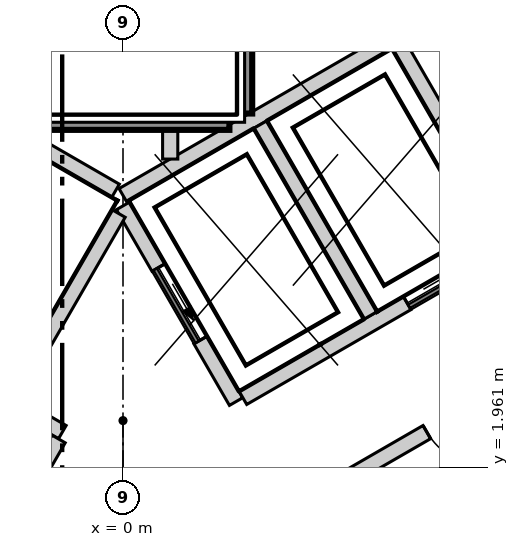
"""IFC4 building model, lengths in metres.
Left out: names, types, materials, properties, quantities, classifications, styles, units other than length and angle.
Written with IfcOpenShell. Run it as: python <this file> out.ifc"""

import sys

from ifc_helpers import new_model, si_unit, direction, frame, frame_2d, origin, place, context, subcontext, project, spatial, polyline, rectangle, outline, extrude, element, fill, save


model = new_model("IFC4")
c1 = context("Model", 3, precision=1e-05, world=origin(), true_north=direction((0.0, 1.0)))
c2 = subcontext(c1, "Body", "Model", "MODEL_VIEW")
j1 = project(units=[si_unit("LENGTHUNIT", "METRE"), si_unit("PLANEANGLEUNIT", "RADIAN")], contexts=[c1])
p1 = place(None, origin())
s1 = spatial("IfcSite", under=j1, at=p1, CompositionType="ELEMENT")
p2 = place(p1, origin())
s2 = spatial("IfcBuilding", under=s1, at=p2, CompositionType="ELEMENT")
p3 = place(p2, frame((0.0, 0.0, 300.7)))
s3 = spatial("IfcBuildingStorey", under=s2, at=p3, CompositionType="ELEMENT", Elevation=300.7)
p4 = place(p3, frame((12.384, -5.15, -0.3), z_axis=(0.0, 0.0, 1.0), x_axis=(-0.500000539815, 0.866025092122, 0.0)))
e1 = element("IfcWall", 1, at=p4, inside=s3, PredefinedType="SHEAR", context=c2, shape_type="SweptSolid", body=[
    extrude(outline(polyline([(-0.173, -0.301), (1.795, -0.301), (3.763, -0.301), (5.731, -0.301), (7.7, -0.301), (9.668, -0.301), (11.636, -0.301), (13.604, -0.3), (15.573, -0.3), (17.541, -0.3), (19.509, -0.3), (21.477, -0.3), (21.131, 0.3), (19.226, 0.3), (17.321, 0.3), (15.415, 0.3), (13.51, 0.3), (11.605, 0.3), (9.699, 0.3), (7.794, 0.3), (5.889, 0.3), (3.984, 0.3), (2.078, 0.3), (0.173, 0.3), (-0.173, -0.301)])), origin(), (0.0, 0.0, 1.0), 3.6),
])
p5 = place(p4, frame((16.328, 0.0, 0.3)))
e2 = element("IfcOpeningElement", 2, at=p5, cuts=e1, PredefinedType="OPENING", context=c2, shape_type="SweptSolid", body=[
    extrude(rectangle(XDim=1.0, YDim=2.1, at=frame_2d((0.5, 1.05))), frame((0.0, 0.31, 0.0), z_axis=(0.0, -1.0, 0.0), x_axis=(1.0, 0.0, 0.0)), (0.0, 0.0, 1.0), 0.621),
])
p6 = place(p4, frame((4.777, 0.0, 0.3)))
e3 = element("IfcOpeningElement", 3, at=p6, cuts=e1, PredefinedType="OPENING", context=c2, shape_type="SweptSolid", body=[
    extrude(rectangle(XDim=0.9, YDim=2.1, at=frame_2d((0.45, 1.05))), frame((0.0, 0.31, 0.0), z_axis=(0.0, -1.0, 0.0), x_axis=(1.0, 0.0, 0.0)), (0.0, 0.0, 1.0), 0.621),
])
p7 = place(p3, frame((24.96, -11.578, 0.0), z_axis=(0.0, 0.0, 1.0), x_axis=(-0.500002391419, 0.866024023094, 0.0)))
e4 = element("IfcWall", 4, at=p7, inside=s3, PredefinedType="ELEMENTEDWALL", context=c2, shape_type="SweptSolid", body=[
    extrude(rectangle(XDim=44.994, YDim=0.2, at=frame_2d((22.497, 0.0))), origin(), (0.0, 0.0, 1.0), 3.3),
])
p8 = place(p7, frame((2.103, 0.0, 0.9)))
e5 = element("IfcOpeningElement", 5, at=p8, cuts=e4, PredefinedType="OPENING", context=c2, shape_type="SweptSolid", body=[
    extrude(rectangle(XDim=3.7, YDim=2.2, at=frame_2d((1.85, 1.1))), frame((0.0, 0.11, 0.0), z_axis=(0.0, -1.0, 0.0), x_axis=(1.0, 0.0, 0.0)), (0.0, 0.0, 1.0), 0.22),
])
p9 = place(p7, frame((7.404, 0.0, 0.9)))
e6 = element("IfcOpeningElement", 6, at=p9, cuts=e4, PredefinedType="OPENING", context=c2, shape_type="SweptSolid", body=[
    extrude(rectangle(XDim=3.7, YDim=2.2, at=frame_2d((1.85, 1.1))), frame((0.0, 0.11, 0.0), z_axis=(0.0, -1.0, 0.0), x_axis=(1.0, 0.0, 0.0)), (0.0, 0.0, 1.0), 0.22),
])
p10 = place(p7, frame((12.705, 0.0, 0.9)))
e7 = element("IfcOpeningElement", 7, at=p10, cuts=e4, PredefinedType="OPENING", context=c2, shape_type="SweptSolid", body=[
    extrude(rectangle(XDim=3.7, YDim=2.2, at=frame_2d((1.85, 1.1))), frame((0.0, 0.11, 0.0), z_axis=(0.0, -1.0, 0.0), x_axis=(1.0, 0.0, 0.0)), (0.0, 0.0, 1.0), 0.22),
])
p11 = place(p7, frame((18.006, 0.0, 0.9)))
e8 = element("IfcOpeningElement", 8, at=p11, cuts=e4, PredefinedType="OPENING", context=c2, shape_type="SweptSolid", body=[
    extrude(rectangle(XDim=3.7, YDim=2.2, at=frame_2d((1.85, 1.1))), frame((0.0, 0.11, 0.0), z_axis=(0.0, -1.0, 0.0), x_axis=(1.0, 0.0, 0.0)), (0.0, 0.0, 1.0), 0.22),
])
p12 = place(p7, frame((23.308, 0.0, 0.9)))
e9 = element("IfcOpeningElement", 9, at=p12, cuts=e4, PredefinedType="OPENING", context=c2, shape_type="SweptSolid", body=[
    extrude(rectangle(XDim=3.7, YDim=2.2, at=frame_2d((1.85, 1.1))), frame((0.0, 0.11, 0.0), z_axis=(0.0, -1.0, 0.0), x_axis=(1.0, 0.0, 0.0)), (0.0, 0.0, 1.0), 0.22),
])
p13 = place(p7, frame((28.609, 0.0, 0.9)))
e10 = element("IfcOpeningElement", 10, at=p13, cuts=e4, PredefinedType="OPENING", context=c2, shape_type="SweptSolid", body=[
    extrude(rectangle(XDim=3.7, YDim=2.2, at=frame_2d((1.85, 1.1))), frame((0.0, 0.11, 0.0), z_axis=(0.0, -1.0, 0.0), x_axis=(1.0, 0.0, 0.0)), (0.0, 0.0, 1.0), 0.22),
])
p14 = place(p7, frame((33.91, 0.0, 0.9)))
e11 = element("IfcOpeningElement", 11, at=p14, cuts=e4, PredefinedType="OPENING", context=c2, shape_type="SweptSolid", body=[
    extrude(rectangle(XDim=3.7, YDim=2.2, at=frame_2d((1.85, 1.1))), frame((0.0, 0.11, 0.0), z_axis=(0.0, -1.0, 0.0), x_axis=(1.0, 0.0, 0.0)), (0.0, 0.0, 1.0), 0.22),
])
p15 = place(p7, frame((39.211, 0.0, 0.9)))
e12 = element("IfcOpeningElement", 12, at=p15, cuts=e4, PredefinedType="OPENING", context=c2, shape_type="SweptSolid", body=[
    extrude(rectangle(XDim=3.7, YDim=2.2, at=frame_2d((1.85, 1.1))), frame((0.0, 0.11, 0.0), z_axis=(0.0, -1.0, 0.0), x_axis=(1.0, 0.0, 0.0)), (0.0, 0.0, 1.0), 0.22),
])
p16 = place(p3, frame((-17.679, -10.12, 0.0), z_axis=(0.0, 0.0, 1.0), x_axis=(0.500008955215, 0.866020233427, 0.0)))
e13 = element("IfcWall", 13, at=p16, inside=s3, PredefinedType="PARTITIONING", context=c2, shape_type="SweptSolid", body=[
    extrude(rectangle(XDim=35.357, YDim=0.15, at=frame_2d((17.679, 0.0))), origin(), (0.0, 0.0, 1.0), 3.3),
])
p17 = place(p16, frame((31.307, 0.0, 0.0)))
e14 = element("IfcOpeningElement", 14, at=p17, cuts=e13, PredefinedType="OPENING", context=c2, shape_type="SweptSolid", body=[
    extrude(rectangle(XDim=1.0, YDim=2.1, at=frame_2d((0.5, 1.05))), frame((0.0, 0.085, 0.0), z_axis=(0.0, -1.0, 0.0), x_axis=(1.0, 0.0, 0.0)), (0.0, 0.0, 1.0), 0.17),
])
p18 = place(p16, frame((20.056, 0.0, 0.0)))
e15 = element("IfcOpeningElement", 15, at=p18, cuts=e13, PredefinedType="OPENING", context=c2, shape_type="SweptSolid", body=[
    extrude(rectangle(XDim=1.0, YDim=2.1, at=frame_2d((0.5, 1.05))), frame((0.0, 0.085, 0.0), z_axis=(0.0, -1.0, 0.0), x_axis=(1.0, 0.0, 0.0)), (0.0, 0.0, 1.0), 0.17),
])
p19 = place(p16, frame((13.253, 0.0, 0.0)))
e16 = element("IfcOpeningElement", 16, at=p19, cuts=e13, PredefinedType="OPENING", context=c2, shape_type="SweptSolid", body=[
    extrude(rectangle(XDim=1.0, YDim=2.1, at=frame_2d((0.5, 1.05))), frame((0.0, 0.085, 0.0), z_axis=(0.0, -1.0, 0.0), x_axis=(1.0, 0.0, 0.0)), (0.0, 0.0, 1.0), 0.17),
])
p20 = place(p16, frame((7.653, 0.0, 0.0)))
e17 = element("IfcOpeningElement", 17, at=p20, cuts=e13, PredefinedType="OPENING", context=c2, shape_type="SweptSolid", body=[
    extrude(rectangle(XDim=1.0, YDim=2.1, at=frame_2d((0.5, 1.05))), frame((0.0, 0.085, 0.0), z_axis=(0.0, -1.0, 0.0), x_axis=(1.0, 0.0, 0.0)), (0.0, 0.0, 1.0), 0.17),
])
p21 = place(p16, frame((2.952, 0.0, 0.0)))
e18 = element("IfcOpeningElement", 18, at=p21, cuts=e13, PredefinedType="OPENING", context=c2, shape_type="SweptSolid", body=[
    extrude(rectangle(XDim=1.0, YDim=2.1, at=frame_2d((0.5, 1.05))), frame((0.0, 0.085, 0.0), z_axis=(0.0, -1.0, 0.0), x_axis=(1.0, 0.0, 0.0)), (0.0, 0.0, 1.0), 0.17),
])
p22 = place(p3, frame((0.075, 20.37, 0.0), z_axis=(0.0, 0.0, 1.0), x_axis=(0.500009775255, -0.866019759965, 0.0)))
e19 = element("IfcWall", 19, at=p22, inside=s3, PredefinedType="PARTITIONING", context=c2, shape_type="SweptSolid", body=[
    extrude(rectangle(XDim=35.207, YDim=0.15, at=frame_2d((17.604, 0.0))), origin(), (0.0, 0.0, 1.0), 3.3),
])
p23 = place(p22, frame((31.307, 0.0, 0.0)))
e20 = element("IfcOpeningElement", 20, at=p23, cuts=e19, PredefinedType="OPENING", context=c2, shape_type="SweptSolid", body=[
    extrude(rectangle(XDim=1.0, YDim=2.1, at=frame_2d((0.5, 1.05))), frame((0.0, 0.085, 0.0), z_axis=(0.0, -1.0, 0.0), x_axis=(1.0, 0.0, 0.0)), (0.0, 0.0, 1.0), 0.17),
])
p24 = place(p22, frame((20.355, 0.0, 0.0)))
e21 = element("IfcOpeningElement", 21, at=p24, cuts=e19, PredefinedType="OPENING", context=c2, shape_type="SweptSolid", body=[
    extrude(rectangle(XDim=1.0, YDim=2.1, at=frame_2d((0.5, 1.05))), frame((0.0, 0.085, 0.0), z_axis=(0.0, -1.0, 0.0), x_axis=(1.0, 0.0, 0.0)), (0.0, 0.0, 1.0), 0.17),
])
p25 = place(p22, frame((24.355, 0.0, 0.0)))
e22 = element("IfcOpeningElement", 22, at=p25, cuts=e19, PredefinedType="OPENING", context=c2, shape_type="SweptSolid", body=[
    extrude(rectangle(XDim=0.9, YDim=2.1, at=frame_2d((0.45, 1.05))), frame((0.0, 0.085, 0.0), z_axis=(0.0, -1.0, 0.0), x_axis=(1.0, 0.0, 0.0)), (0.0, 0.0, 1.0), 0.17),
])
p26 = place(p22, frame((22.255, 0.0, 0.0)))
e23 = element("IfcOpeningElement", 23, at=p26, cuts=e19, PredefinedType="OPENING", context=c2, shape_type="SweptSolid", body=[
    extrude(rectangle(XDim=0.9, YDim=2.1, at=frame_2d((0.45, 1.05))), frame((0.0, 0.085, 0.0), z_axis=(0.0, -1.0, 0.0), x_axis=(1.0, 0.0, 0.0)), (0.0, 0.0, 1.0), 0.17),
])
p27 = place(p22, frame((8.453, 0.0, 0.0)))
e24 = element("IfcOpeningElement", 24, at=p27, cuts=e19, PredefinedType="OPENING", context=c2, shape_type="SweptSolid", body=[
    extrude(rectangle(XDim=1.0, YDim=2.1, at=frame_2d((0.5, 1.05))), frame((0.0, 0.085, 0.0), z_axis=(0.0, -1.0, 0.0), x_axis=(1.0, 0.0, 0.0)), (0.0, 0.0, 1.0), 0.17),
])
p28 = place(p22, frame((13.753, 0.0, 0.0)))
e25 = element("IfcOpeningElement", 25, at=p28, cuts=e19, PredefinedType="OPENING", context=c2, shape_type="SweptSolid", body=[
    extrude(rectangle(XDim=0.9, YDim=2.1, at=frame_2d((0.45, 1.05))), frame((0.0, 0.085, 0.0), z_axis=(0.0, -1.0, 0.0), x_axis=(1.0, 0.0, 0.0)), (0.0, 0.0, 1.0), 0.17),
])
p29 = place(p22, frame((11.553, 0.0, 0.0)))
e26 = element("IfcOpeningElement", 26, at=p29, cuts=e19, PredefinedType="OPENING", context=c2, shape_type="SweptSolid", body=[
    extrude(rectangle(XDim=0.9, YDim=2.1, at=frame_2d((0.45, 1.05))), frame((0.0, 0.085, 0.0), z_axis=(0.0, -1.0, 0.0), x_axis=(1.0, 0.0, 0.0)), (0.0, 0.0, 1.0), 0.17),
])
p30 = place(p22, frame((2.951, 0.0, 0.0)))
e27 = element("IfcOpeningElement", 27, at=p30, cuts=e19, PredefinedType="OPENING", context=c2, shape_type="SweptSolid", body=[
    extrude(rectangle(XDim=1.0, YDim=2.1, at=frame_2d((0.5, 1.05))), frame((0.0, 0.085, 0.0), z_axis=(0.0, -1.0, 0.0), x_axis=(1.0, 0.0, 0.0)), (0.0, 0.0, 1.0), 0.17),
])
p31 = place(p3, frame((-0.002, 5.541, 0.0), z_axis=(0.0, 0.0, 1.0), x_axis=(0.86600155993, 0.500041296494, 0.0)))
e28 = element("IfcWall", 28, at=p31, inside=s3, PredefinedType="SOLIDWALL", context=c2, shape_type="SweptSolid", body=[
    extrude(rectangle(XDim=4.132, YDim=0.2, at=frame_2d((2.066, 0.0))), origin(), (0.0, 0.0, 1.0), 3.3),
])
p32 = place(p3, frame((0.0, 5.4, 0.0), z_axis=(0.0, 0.0, 1.0), x_axis=(0.500103862429, -0.865965430478, 0.0)))
e29 = element("IfcWall", 29, at=p32, inside=s3, PredefinedType="SOLIDWALL", context=c2, shape_type="SweptSolid", body=[
    extrude(rectangle(XDim=2.973, YDim=0.2, at=frame_2d((1.487, 0.0))), origin(), (0.0, 0.0, 1.0), 3.3),
])
p33 = place(p32, frame((0.937, 0.0, 0.0)))
e30 = element("IfcOpeningElement", 30, at=p33, cuts=e29, PredefinedType="OPENING", context=c2, shape_type="SweptSolid", body=[
    extrude(rectangle(XDim=1.1, YDim=2.1, at=frame_2d((0.55, 1.05))), frame((0.0, 0.11, 0.0), z_axis=(0.0, -1.0, 0.0), x_axis=(1.0, 0.0, 0.0)), (0.0, 0.0, 1.0), 0.22),
])
p34 = place(p3, frame((1.578, 2.874, 0.0), z_axis=(0.0, 0.0, 1.0), x_axis=(0.866045911672, 0.499964477614, 0.0)))
e31 = element("IfcWall", 31, at=p34, inside=s3, PredefinedType="SOLIDWALL", context=c2, shape_type="SweptSolid", body=[
    extrude(rectangle(XDim=5.327, YDim=0.2, at=frame_2d((2.663, 0.0))), origin(), (0.0, 0.0, 1.0), 3.3),
])
p35 = place(p34, frame((2.496, 0.0, 0.0)))
e32 = element("IfcOpeningElement", 32, at=p35, cuts=e31, PredefinedType="OPENING", context=c2, shape_type="SweptSolid", body=[
    extrude(rectangle(XDim=1.1, YDim=2.1, at=frame_2d((0.55, 1.05))), frame((0.0, 0.11, 0.0), z_axis=(0.0, -1.0, 0.0), x_axis=(1.0, 0.0, 0.0)), (0.0, 0.0, 1.0), 0.22),
])
for number, where, z_axis, x_axis in (
    (33, (3.626, 7.52, 0.0), (0.0, 0.0, 1.0), (0.5, -0.866, 0.0)),
    (34, (1.807, 6.47, 0.0), (0.0, 0.0, 1.0), (0.5, -0.866, 0.0)),
):
    element("IfcWall", number, at=place(p3, frame(where, z_axis=z_axis, x_axis=x_axis)), inside=s3, PredefinedType="SOLIDWALL", context=c2, shape_type="SweptSolid", body=[
        extrude(rectangle(XDim=2.9, YDim=0.2, at=frame_2d((1.45, 0.0))), origin(), (0.0, 0.0, 1.0), 3.3),
    ])
p36 = place(p3, frame((2.548, 1.587, 0.0), z_axis=(0.0, 0.0, 1.0), x_axis=(0.866004344652, 0.500036473714, 0.0)))
e35 = element("IfcWall", 35, at=p36, inside=s3, PredefinedType="SOLIDWALL", context=c2, shape_type="SweptSolid", body=[
    extrude(rectangle(XDim=4.15, YDim=0.2, at=frame_2d((2.075, 0.0))), origin(), (0.0, 0.0, 1.0), 3.3),
])
p37 = place(p36, frame((1.675, 0.0, 0.0)))
e36 = element("IfcOpeningElement", 36, at=p37, cuts=e35, PredefinedType="OPENING", context=c2, shape_type="SweptSolid", body=[
    extrude(rectangle(XDim=0.9, YDim=2.1, at=frame_2d((0.45, 1.05))), frame((0.0, 0.11, 0.0), z_axis=(0.0, -1.0, 0.0), x_axis=(1.0, 0.0, 0.0)), (0.0, 0.0, 1.0), 0.22),
])
p38 = place(p3, frame((-1.488, 2.822, 0.0), z_axis=(0.0, 0.0, 1.0), x_axis=(0.866236612152, -0.499633997809, 0.0)))
e37 = element("IfcWall", 37, at=p38, inside=s3, PredefinedType="SOLIDWALL", context=c2, shape_type="SweptSolid", body=[
    extrude(rectangle(XDim=0.796, YDim=0.2, at=frame_2d((0.398, 0.0))), origin(), (0.0, 0.0, 1.0), 3.3),
])
p39 = place(p3, frame((-2.444, -0.433, 0.0), z_axis=(0.0, 0.0, 1.0), x_axis=(0.500035624827, 0.866004834804, 0.0)))
e38 = element("IfcWall", 38, at=p39, inside=s3, PredefinedType="SOLIDWALL", context=c2, shape_type="SweptSolid", body=[
    extrude(rectangle(XDim=3.194, YDim=0.2, at=frame_2d((1.597, 0.0))), origin(), (0.0, 0.0, 1.0), 3.3),
])
p40 = place(p3, frame((-1.67, 6.507, 0.0), z_axis=(0.0, 0.0, 1.0), x_axis=(0.865941441609, -0.500145398563, 0.0)))
e39 = element("IfcWall", 39, at=p40, inside=s3, PredefinedType="SOLIDWALL", context=c2, shape_type="SweptSolid", body=[
    extrude(rectangle(XDim=1.815, YDim=0.2, at=frame_2d((0.908, 0.0))), origin(), (0.0, 0.0, 1.0), 3.3),
])
p41 = place(p3, frame((-1.438, 2.909, 0.0), z_axis=(0.0, 0.0, 1.0), x_axis=(0.499829630636, 0.866123744241, 0.0)))
e40 = element("IfcWall", 40, at=p41, inside=s3, PredefinedType="SOLIDWALL", context=c2, shape_type="SweptSolid", body=[
    extrude(rectangle(XDim=2.761, YDim=0.2, at=frame_2d((1.38, 0.0))), origin(), (0.0, 0.0, 1.0), 3.3),
])
p42 = place(p3, frame((0.621, 6.016, 0.0), z_axis=(0.0, 0.0, 1.0), x_axis=(0.0, 1.0, 0.0)))
e41 = element("IfcWall", 41, at=p42, inside=s3, PredefinedType="SOLIDWALL", context=c2, shape_type="SweptSolid", body=[
    extrude(rectangle(XDim=0.384, YDim=0.2, at=frame_2d((0.192, 0.0))), origin(), (0.0, 0.0, 1.0), 3.3),
])
p43 = place(p3, frame((1.6, 6.615, 0.0), z_axis=(0.0, 0.0, 1.0), x_axis=(0.0, 1.0, 0.0)))
e42 = element("IfcWall", 42, at=p43, inside=s3, PredefinedType="SOLIDWALL", context=c2, shape_type="SweptSolid", body=[
    extrude(rectangle(XDim=6.665, YDim=0.2, at=frame_2d((3.333, 0.0))), origin(), (0.0, 0.0, 1.0), 3.3),
])
p44 = place(p3, frame((-1.4, 6.5, 0.0), z_axis=(0.0, 0.0, 1.0), x_axis=(1.0, 0.0, 0.0)))
e43 = element("IfcWall", 43, at=p44, inside=s3, PredefinedType="SOLIDWALL", context=c2, shape_type="SweptSolid", body=[
    extrude(rectangle(XDim=2.8, YDim=0.2, at=frame_2d((1.4, 0.0))), origin(), (0.0, 0.0, 1.0), 3.3),
])
p45 = place(p33, origin())
e44 = element("IfcDoor", 44, at=p45, inside=s3, OperationType="SLIDING_TO_LEFT", PredefinedType="DOOR", context=c2, shape_type="SweptSolid", body=[
    extrude(rectangle(XDim=1.1, YDim=2.1, at=frame_2d((0.55, 1.05))), frame((0.0, 0.025, 0.0), z_axis=(0.0, -1.0, 0.0), x_axis=(1.0, 0.0, 0.0)), (0.0, 0.0, 1.0), 0.05),
])
fill(e30, e44)
p46 = place(p35, origin())
e45 = element("IfcDoor", 45, at=p46, inside=s3, OperationType="SLIDING_TO_LEFT", PredefinedType="DOOR", context=c2, shape_type="SweptSolid", body=[
    extrude(rectangle(XDim=1.1, YDim=2.1, at=frame_2d((0.55, 1.05))), frame((0.0, 0.025, 0.0), z_axis=(0.0, -1.0, 0.0), x_axis=(1.0, 0.0, 0.0)), (0.0, 0.0, 1.0), 0.05),
])
fill(e32, e45)
p47 = place(p37, origin())
e46 = element("IfcDoor", 46, at=p47, inside=s3, OperationType="SINGLE_SWING_RIGHT", PredefinedType="DOOR", context=c2, shape_type="SweptSolid", body=[
    extrude(rectangle(XDim=0.9, YDim=2.1, at=frame_2d((0.45, 1.05))), frame((0.0, 0.025, 0.0), z_axis=(0.0, -1.0, 0.0), x_axis=(1.0, 0.0, 0.0)), (0.0, 0.0, 1.0), 0.05),
])
fill(e36, e46)
save(model, sys.argv[1])
